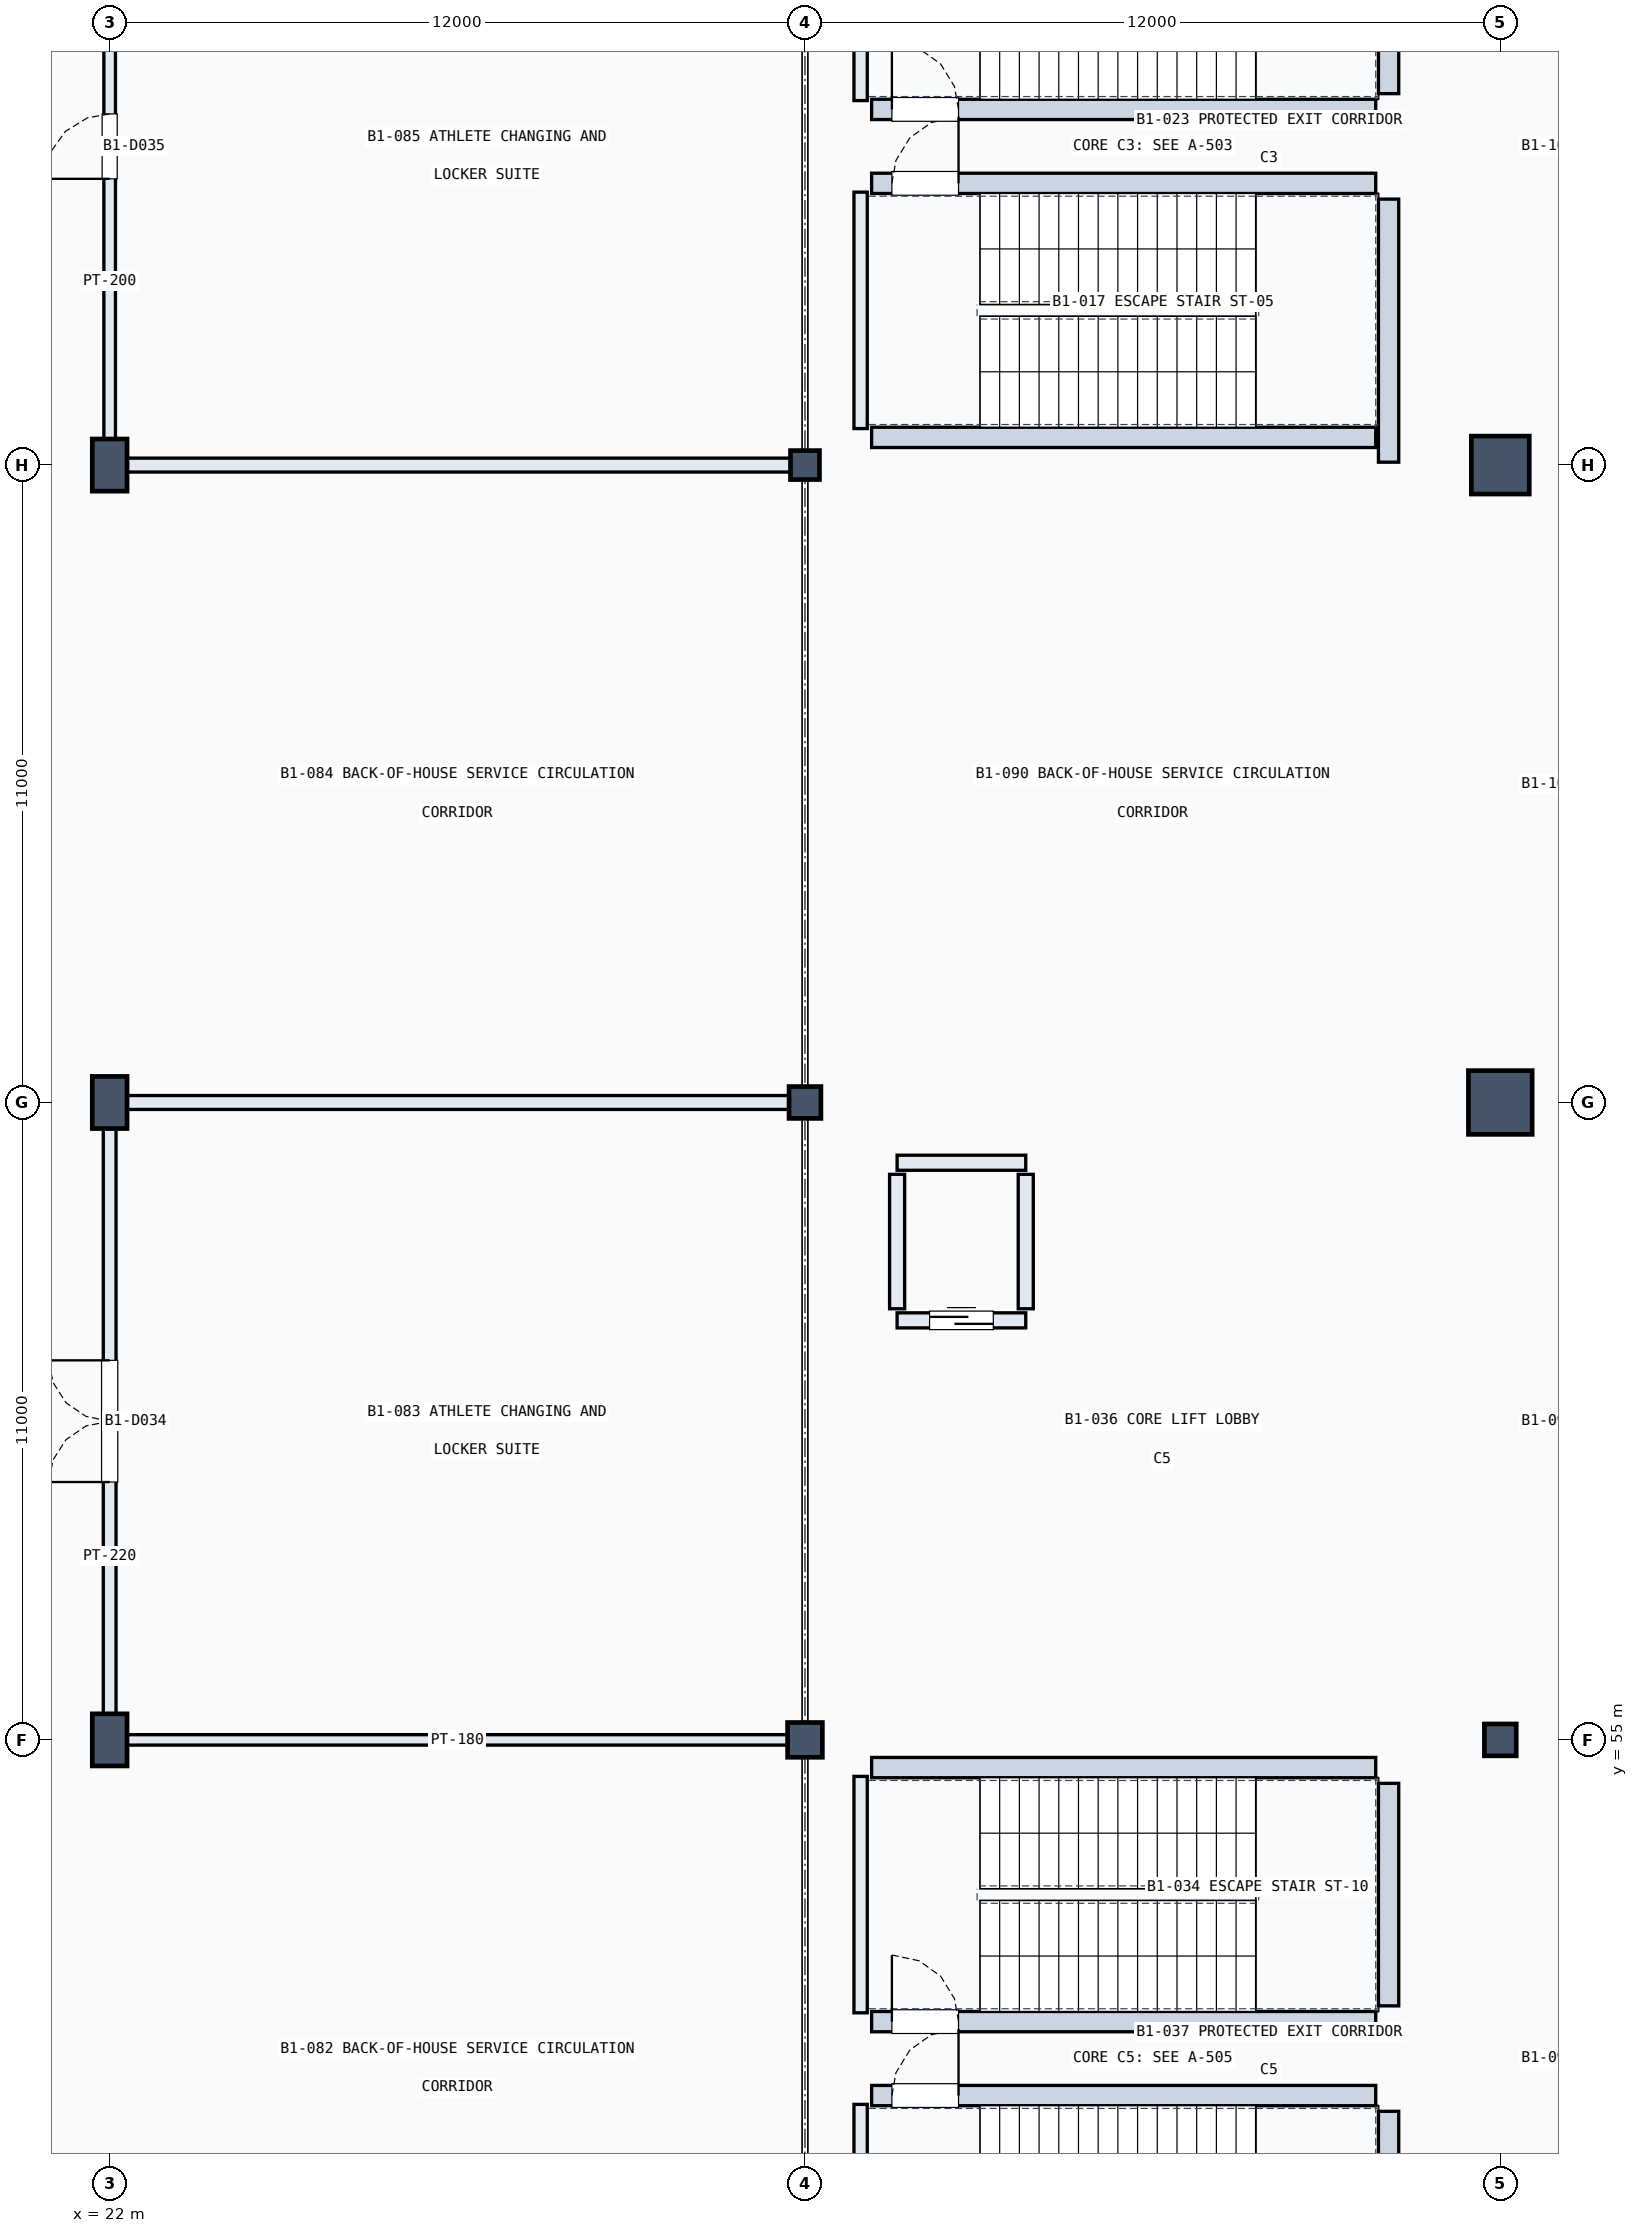
"""IFC4 building model, lengths in metres.
Left out: names, types, materials, properties, quantities, classifications, styles, units other than length and angle.
Written with IfcOpenShell. Run it as: python <this file> out.ifc"""

import sys

from ifc_helpers import new_model, si_unit, direction, frame, frame_2d, origin, origin_2d, place, context, subcontext, project, spatial, rectangle, extrude, element, fill, save


model = new_model("IFC4")
c1 = context("Model", 3, precision=1e-05, world=origin(), true_north=direction((0.0, 1.0)))
c2 = subcontext(c1, "Body", "Model", "MODEL_VIEW")
j1 = project(units=[si_unit("LENGTHUNIT", "METRE"), si_unit("PLANEANGLEUNIT", "RADIAN")], contexts=[c1])
p1 = place(None, origin())
s1 = spatial("IfcSite", under=j1, at=p1, CompositionType="ELEMENT")
p2 = place(p1, origin())
s2 = spatial("IfcBuilding", under=s1, at=p2, CompositionType="ELEMENT")
p3 = place(p2, frame((0.0, 0.0, -5.4)))
s3 = spatial("IfcBuildingStorey", under=s2, at=p3, CompositionType="ELEMENT", Elevation=-5.4)
for number, where, z_axis, x_axis in (
    (1, (22.0, 55.0, 0.0), (0.0, 0.0, 1.0), (1.0, 0.0, 0.0)),
    (2, (22.0, 66.0, 0.0), (0.0, 0.0, 1.0), (1.0, 0.0, 0.0)),
    (3, (22.0, 77.0, 0.0), (0.0, 0.0, 1.0), (1.0, 0.0, 0.0)),
):
    element("IfcColumn", number, at=place(p3, frame(where, z_axis=z_axis, x_axis=x_axis)), inside=s3, PredefinedType="COLUMN", context=c2, shape_type="SweptSolid", body=[
        extrude(rectangle(XDim=0.6, YDim=0.9, at=origin_2d()), origin(), (0.0, 0.0, 1.0), 5.4),
    ])
p4 = place(p3, frame((34.0, 55.0, 0.0), z_axis=(0.0, 0.0, 1.0), x_axis=(1.0, 0.0, 0.0)))
e4 = element("IfcColumn", 4, at=p4, inside=s3, PredefinedType="COLUMN", context=c2, shape_type="SweptSolid", body=[
    extrude(rectangle(XDim=0.6, YDim=0.6, at=origin_2d()), origin(), (0.0, 0.0, 1.0), 5.4),
])
p5 = place(p3, frame((34.0, 66.0, 0.0), z_axis=(0.0, 0.0, 1.0), x_axis=(1.0, 0.0, 0.0)))
e5 = element("IfcColumn", 5, at=p5, inside=s3, PredefinedType="COLUMN", context=c2, shape_type="SweptSolid", body=[
    extrude(rectangle(XDim=0.55, YDim=0.55, at=origin_2d()), origin(), (0.0, 0.0, 1.0), 5.4),
])
p6 = place(p3, frame((34.0, 77.0, 0.0), z_axis=(0.0, 0.0, 1.0), x_axis=(1.0, 0.0, 0.0)))
e6 = element("IfcColumn", 6, at=p6, inside=s3, PredefinedType="COLUMN", context=c2, shape_type="SweptSolid", body=[
    extrude(rectangle(XDim=0.5, YDim=0.5, at=origin_2d()), origin(), (0.0, 0.0, 1.0), 5.4),
])
p7 = place(p3, frame((46.0, 55.0, 0.0), z_axis=(0.0, 0.0, 1.0), x_axis=(1.0, 0.0, 0.0)))
e7 = element("IfcColumn", 7, at=p7, inside=s3, PredefinedType="COLUMN", context=c2, shape_type="SweptSolid", body=[
    extrude(rectangle(XDim=0.55, YDim=0.55, at=origin_2d()), origin(), (0.0, 0.0, 1.0), 5.4),
])
p8 = place(p3, frame((46.0, 66.0, 0.0), z_axis=(0.0, 0.0, 1.0), x_axis=(1.0, 0.0, 0.0)))
e8 = element("IfcColumn", 8, at=p8, inside=s3, PredefinedType="COLUMN", context=c2, shape_type="SweptSolid", body=[
    extrude(rectangle(XDim=1.1, YDim=1.1, at=origin_2d()), origin(), (0.0, 0.0, 1.0), 5.4),
])
p9 = place(p3, frame((46.0, 77.0, 0.0), z_axis=(0.0, 0.0, 1.0), x_axis=(1.0, 0.0, 0.0)))
e9 = element("IfcColumn", 9, at=p9, inside=s3, PredefinedType="COLUMN", context=c2, shape_type="SweptSolid", body=[
    extrude(rectangle(XDim=1.0, YDim=1.0, at=origin_2d()), origin(), (0.0, 0.0, 1.0), 5.4),
])
p10 = place(p3, frame((34.96, 77.63, 0.0), z_axis=(0.0, 0.0, 1.0), x_axis=(0.0, 1.0, 0.0)))
e10 = element("IfcWall", 10, at=p10, inside=s3, PredefinedType="SOLIDWALL", context=c2, shape_type="SweptSolid", body=[
    extrude(rectangle(XDim=4.08, YDim=0.23, at=frame_2d((2.04, 0.0))), origin(), (0.0, 0.0, 1.0), 4.43),
])
p11 = place(p3, frame((44.072, 77.05, 0.0), z_axis=(0.0, 0.0, 1.0), x_axis=(0.0, 1.0, 0.0)))
e11 = element("IfcWall", 11, at=p11, inside=s3, PredefinedType="SOLIDWALL", context=c2, shape_type="SweptSolid", body=[
    extrude(rectangle(XDim=4.54, YDim=0.35, at=frame_2d((2.27, 0.0))), origin(), (0.0, 0.0, 1.0), 5.04),
])
p12 = place(p3, frame((35.15, 77.478, 0.0), z_axis=(0.0, 0.0, 1.0), x_axis=(1.0, 0.0, 0.0)))
e12 = element("IfcWall", 12, at=p12, inside=s3, PredefinedType="SOLIDWALL", context=c2, shape_type="SweptSolid", body=[
    extrude(rectangle(XDim=8.7, YDim=0.35, at=frame_2d((4.35, 0.0))), origin(), (0.0, 0.0, 1.0), 5.04),
])
p13 = place(p3, frame((35.15, 81.862, 0.0), z_axis=(0.0, 0.0, 1.0), x_axis=(1.0, 0.0, 0.0)))
e13 = element("IfcWall", 13, at=p13, inside=s3, PredefinedType="SOLIDWALL", context=c2, shape_type="SweptSolid", body=[
    extrude(rectangle(XDim=8.7, YDim=0.35, at=frame_2d((4.35, 0.0))), origin(), (0.0, 0.0, 1.0), 5.04),
])
p14 = place(p13, frame((0.35, 0.0, 0.0)))
e14 = element("IfcOpeningElement", 14, at=p14, cuts=e13, PredefinedType="OPENING", context=c2, shape_type="SweptSolid", body=[
    extrude(rectangle(XDim=1.15, YDim=2.2, at=frame_2d((0.575, 1.1))), frame((0.0, 0.185, 0.0), z_axis=(0.0, -1.0, 0.0), x_axis=(1.0, 0.0, 0.0)), (0.0, 0.0, 1.0), 0.37),
])
p15 = place(p3, frame((34.96, 83.29, 0.0), z_axis=(0.0, 0.0, 1.0), x_axis=(0.0, 1.0, 0.0)))
e15 = element("IfcWall", 15, at=p15, inside=s3, PredefinedType="SOLIDWALL", context=c2, shape_type="SweptSolid", body=[
    extrude(rectangle(XDim=4.08, YDim=0.23, at=frame_2d((2.04, 0.0))), origin(), (0.0, 0.0, 1.0), 4.43),
])
p16 = place(p3, frame((44.072, 83.41, 0.0), z_axis=(0.0, 0.0, 1.0), x_axis=(0.0, 1.0, 0.0)))
e16 = element("IfcWall", 16, at=p16, inside=s3, PredefinedType="SOLIDWALL", context=c2, shape_type="SweptSolid", body=[
    extrude(rectangle(XDim=3.84, YDim=0.35, at=frame_2d((1.92, 0.0))), origin(), (0.0, 0.0, 1.0), 5.04),
])
p17 = place(p3, frame((35.15, 83.138, 0.0), z_axis=(0.0, 0.0, 1.0), x_axis=(1.0, 0.0, 0.0)))
e17 = element("IfcWall", 17, at=p17, inside=s3, PredefinedType="SOLIDWALL", context=c2, shape_type="SweptSolid", body=[
    extrude(rectangle(XDim=8.7, YDim=0.35, at=frame_2d((4.35, 0.0))), origin(), (0.0, 0.0, 1.0), 5.04),
])
p18 = place(p17, frame((0.35, 0.0, 0.0)))
e18 = element("IfcOpeningElement", 18, at=p18, cuts=e17, PredefinedType="OPENING", context=c2, shape_type="SweptSolid", body=[
    extrude(rectangle(XDim=1.15, YDim=2.2, at=frame_2d((0.575, 1.1))), frame((0.0, 0.185, 0.0), z_axis=(0.0, -1.0, 0.0), x_axis=(1.0, 0.0, 0.0)), (0.0, 0.0, 1.0), 0.37),
])
p19 = place(p3, frame((34.96, 44.63, 0.0), z_axis=(0.0, 0.0, 1.0), x_axis=(0.0, 1.0, 0.0)))
e19 = element("IfcWall", 19, at=p19, inside=s3, PredefinedType="SOLIDWALL", context=c2, shape_type="SweptSolid", body=[
    extrude(rectangle(XDim=4.08, YDim=0.23, at=frame_2d((2.04, 0.0))), origin(), (0.0, 0.0, 1.0), 4.43),
])
p20 = place(p3, frame((44.072, 44.05, 0.0), z_axis=(0.0, 0.0, 1.0), x_axis=(0.0, 1.0, 0.0)))
e20 = element("IfcWall", 20, at=p20, inside=s3, PredefinedType="SOLIDWALL", context=c2, shape_type="SweptSolid", body=[
    extrude(rectangle(XDim=4.54, YDim=0.35, at=frame_2d((2.27, 0.0))), origin(), (0.0, 0.0, 1.0), 5.04),
])
p21 = place(p3, frame((35.15, 48.862, 0.0), z_axis=(0.0, 0.0, 1.0), x_axis=(1.0, 0.0, 0.0)))
e21 = element("IfcWall", 21, at=p21, inside=s3, PredefinedType="SOLIDWALL", context=c2, shape_type="SweptSolid", body=[
    extrude(rectangle(XDim=8.7, YDim=0.35, at=frame_2d((4.35, 0.0))), origin(), (0.0, 0.0, 1.0), 5.04),
])
p22 = place(p21, frame((0.35, 0.0, 0.0)))
e22 = element("IfcOpeningElement", 22, at=p22, cuts=e21, PredefinedType="OPENING", context=c2, shape_type="SweptSolid", body=[
    extrude(rectangle(XDim=1.15, YDim=2.2, at=frame_2d((0.575, 1.1))), frame((0.0, 0.185, 0.0), z_axis=(0.0, -1.0, 0.0), x_axis=(1.0, 0.0, 0.0)), (0.0, 0.0, 1.0), 0.37),
])
p23 = place(p3, frame((34.96, 50.29, 0.0), z_axis=(0.0, 0.0, 1.0), x_axis=(0.0, 1.0, 0.0)))
e23 = element("IfcWall", 23, at=p23, inside=s3, PredefinedType="SOLIDWALL", context=c2, shape_type="SweptSolid", body=[
    extrude(rectangle(XDim=4.08, YDim=0.23, at=frame_2d((2.04, 0.0))), origin(), (0.0, 0.0, 1.0), 4.43),
])
p24 = place(p3, frame((44.072, 50.41, 0.0), z_axis=(0.0, 0.0, 1.0), x_axis=(0.0, 1.0, 0.0)))
e24 = element("IfcWall", 24, at=p24, inside=s3, PredefinedType="SOLIDWALL", context=c2, shape_type="SweptSolid", body=[
    extrude(rectangle(XDim=3.84, YDim=0.35, at=frame_2d((1.92, 0.0))), origin(), (0.0, 0.0, 1.0), 5.04),
])
p25 = place(p3, frame((35.15, 50.138, 0.0), z_axis=(0.0, 0.0, 1.0), x_axis=(1.0, 0.0, 0.0)))
e25 = element("IfcWall", 25, at=p25, inside=s3, PredefinedType="SOLIDWALL", context=c2, shape_type="SweptSolid", body=[
    extrude(rectangle(XDim=8.7, YDim=0.35, at=frame_2d((4.35, 0.0))), origin(), (0.0, 0.0, 1.0), 5.04),
])
p26 = place(p25, frame((0.35, 0.0, 0.0)))
e26 = element("IfcOpeningElement", 26, at=p26, cuts=e25, PredefinedType="OPENING", context=c2, shape_type="SweptSolid", body=[
    extrude(rectangle(XDim=1.15, YDim=2.2, at=frame_2d((0.575, 1.1))), frame((0.0, 0.185, 0.0), z_axis=(0.0, -1.0, 0.0), x_axis=(1.0, 0.0, 0.0)), (0.0, 0.0, 1.0), 0.37),
])
p27 = place(p3, frame((35.15, 54.522, 0.0), z_axis=(0.0, 0.0, 1.0), x_axis=(1.0, 0.0, 0.0)))
e27 = element("IfcWall", 27, at=p27, inside=s3, PredefinedType="SOLIDWALL", context=c2, shape_type="SweptSolid", body=[
    extrude(rectangle(XDim=8.7, YDim=0.35, at=frame_2d((4.35, 0.0))), origin(), (0.0, 0.0, 1.0), 5.04),
])
p28 = place(p3, frame((35.59, 62.24, 0.0), z_axis=(0.0, 0.0, 1.0), x_axis=(1.0, 0.0, 0.0)))
e28 = element("IfcWall", 28, at=p28, inside=s3, PredefinedType="SOLIDWALL", context=c2, shape_type="SweptSolid", body=[
    extrude(rectangle(XDim=2.22, YDim=0.26, at=frame_2d((1.11, 0.0))), origin(), (0.0, 0.0, 1.0), 5.04),
])
p29 = place(p28, frame((0.56, 0.0, 0.0)))
e29 = element("IfcOpeningElement", 29, at=p29, cuts=e28, PredefinedType="OPENING", context=c2, shape_type="SweptSolid", body=[
    extrude(rectangle(XDim=1.1, YDim=2.15, at=frame_2d((0.55, 1.075))), frame((0.0, 0.14, 0.0), z_axis=(0.0, -1.0, 0.0), x_axis=(1.0, 0.0, 0.0)), (0.0, 0.0, 1.0), 0.28),
])
p30 = place(p3, frame((35.59, 64.96, 0.0), z_axis=(0.0, 0.0, 1.0), x_axis=(1.0, 0.0, 0.0)))
e30 = element("IfcWall", 30, at=p30, inside=s3, PredefinedType="SOLIDWALL", context=c2, shape_type="SweptSolid", body=[
    extrude(rectangle(XDim=2.22, YDim=0.26, at=frame_2d((1.11, 0.0))), origin(), (0.0, 0.0, 1.0), 5.04),
])
for number, where, z_axis, x_axis in (
    (31, (35.59, 62.44, 0.0), (0.0, 0.0, 1.0), (0.0, 1.0, 0.0)),
    (32, (37.81, 62.44, 0.0), (0.0, 0.0, 1.0), (0.0, 1.0, 0.0)),
):
    element("IfcWall", number, at=place(p3, frame(where, z_axis=z_axis, x_axis=x_axis)), inside=s3, PredefinedType="SOLIDWALL", context=c2, shape_type="SweptSolid", body=[
        extrude(rectangle(XDim=2.32, YDim=0.26, at=frame_2d((1.16, 0.0))), origin(), (0.0, 0.0, 1.0), 5.04),
    ])
p31 = place(p3, frame((22.0, 55.22, 0.0), z_axis=(0.0, 0.0, 1.0), x_axis=(0.0, 1.0, 0.0)))
e33 = element("IfcWall", 33, at=p31, inside=s3, PredefinedType="PARTITIONING", context=c2, shape_type="SweptSolid", body=[
    extrude(rectangle(XDim=10.56, YDim=0.22, at=frame_2d((5.28, 0.0))), origin(), (0.0, 0.0, 1.0), 4.08),
])
p32 = place(p31, frame((4.23, 0.0, 0.0)))
e34 = element("IfcOpeningElement", 34, at=p32, cuts=e33, PredefinedType="OPENING", context=c2, shape_type="SweptSolid", body=[
    extrude(rectangle(XDim=2.1, YDim=2.2, at=frame_2d((1.05, 1.1))), frame((0.0, 0.12, 0.0), z_axis=(0.0, -1.0, 0.0), x_axis=(1.0, 0.0, 0.0)), (0.0, 0.0, 1.0), 0.24),
])
p33 = place(p3, frame((22.0, 77.22, 0.0), z_axis=(0.0, 0.0, 1.0), x_axis=(0.0, 1.0, 0.0)))
e35 = element("IfcWall", 35, at=p33, inside=s3, PredefinedType="PARTITIONING", context=c2, shape_type="SweptSolid", body=[
    extrude(rectangle(XDim=10.56, YDim=0.2, at=frame_2d((5.28, 0.0))), origin(), (0.0, 0.0, 1.0), 4.08),
])
p34 = place(p33, frame((4.72, 0.0, 0.0)))
e36 = element("IfcOpeningElement", 36, at=p34, cuts=e35, PredefinedType="OPENING", context=c2, shape_type="SweptSolid", body=[
    extrude(rectangle(XDim=1.12, YDim=2.25, at=frame_2d((0.56, 1.125))), frame((0.0, 0.11, 0.0), z_axis=(0.0, -1.0, 0.0), x_axis=(1.0, 0.0, 0.0)), (0.0, 0.0, 1.0), 0.22),
])
p35 = place(p3, frame((22.22, 55.0, 0.0), z_axis=(0.0, 0.0, 1.0), x_axis=(1.0, 0.0, 0.0)))
e37 = element("IfcWall", 37, at=p35, inside=s3, PredefinedType="PARTITIONING", context=c2, shape_type="SweptSolid", body=[
    extrude(rectangle(XDim=11.56, YDim=0.18, at=frame_2d((5.78, 0.0))), origin(), (0.0, 0.0, 1.0), 4.08),
])
p36 = place(p3, frame((22.22, 66.0, 0.0), z_axis=(0.0, 0.0, 1.0), x_axis=(1.0, 0.0, 0.0)))
e38 = element("IfcWall", 38, at=p36, inside=s3, PredefinedType="PARTITIONING", context=c2, shape_type="SweptSolid", body=[
    extrude(rectangle(XDim=11.56, YDim=0.24, at=frame_2d((5.78, 0.0))), origin(), (0.0, 0.0, 1.0), 4.08),
])
p37 = place(p3, frame((22.22, 77.0, 0.0), z_axis=(0.0, 0.0, 1.0), x_axis=(1.0, 0.0, 0.0)))
e39 = element("IfcWall", 39, at=p37, inside=s3, PredefinedType="PARTITIONING", context=c2, shape_type="SweptSolid", body=[
    extrude(rectangle(XDim=11.57, YDim=0.24, at=frame_2d((5.785, 0.0))), origin(), (0.0, 0.0, 1.0), 4.08),
])
p38 = place(p14, origin())
e40 = element("IfcDoor", 40, at=p38, inside=s3, OperationType="SINGLE_SWING_RIGHT", PredefinedType="DOOR", context=c2, shape_type="SweptSolid", body=[
    extrude(rectangle(XDim=1.15, YDim=2.2, at=frame_2d((0.575, 1.1))), frame((0.0, 0.025, 0.0), z_axis=(0.0, -1.0, 0.0), x_axis=(1.0, 0.0, 0.0)), (0.0, 0.0, 1.0), 0.05),
])
fill(e14, e40)
p39 = place(p18, origin())
e41 = element("IfcDoor", 41, at=p39, inside=s3, OperationType="SINGLE_SWING_LEFT", PredefinedType="DOOR", context=c2, shape_type="SweptSolid", body=[
    extrude(rectangle(XDim=1.15, YDim=2.2, at=frame_2d((0.575, 1.1))), frame((0.0, 0.025, 0.0), z_axis=(0.0, -1.0, 0.0), x_axis=(1.0, 0.0, 0.0)), (0.0, 0.0, 1.0), 0.05),
])
fill(e18, e41)
p40 = place(p22, origin())
e42 = element("IfcDoor", 42, at=p40, inside=s3, OperationType="SINGLE_SWING_RIGHT", PredefinedType="DOOR", context=c2, shape_type="SweptSolid", body=[
    extrude(rectangle(XDim=1.15, YDim=2.2, at=frame_2d((0.575, 1.1))), frame((0.0, 0.025, 0.0), z_axis=(0.0, -1.0, 0.0), x_axis=(1.0, 0.0, 0.0)), (0.0, 0.0, 1.0), 0.05),
])
fill(e22, e42)
p41 = place(p26, origin())
e43 = element("IfcDoor", 43, at=p41, inside=s3, OperationType="SINGLE_SWING_LEFT", PredefinedType="DOOR", context=c2, shape_type="SweptSolid", body=[
    extrude(rectangle(XDim=1.15, YDim=2.2, at=frame_2d((0.575, 1.1))), frame((0.0, 0.025, 0.0), z_axis=(0.0, -1.0, 0.0), x_axis=(1.0, 0.0, 0.0)), (0.0, 0.0, 1.0), 0.05),
])
fill(e26, e43)
p42 = place(p29, origin())
e44 = element("IfcDoor", 44, at=p42, inside=s3, OperationType="SLIDING_TO_LEFT", PredefinedType="DOOR", context=c2, shape_type="SweptSolid", body=[
    extrude(rectangle(XDim=1.1, YDim=2.15, at=frame_2d((0.55, 1.075))), frame((0.0, 0.025, 0.0), z_axis=(0.0, -1.0, 0.0), x_axis=(1.0, 0.0, 0.0)), (0.0, 0.0, 1.0), 0.05),
])
fill(e29, e44)
p43 = place(p32, origin())
e45 = element("IfcDoor", 45, at=p43, inside=s3, OperationType="DOUBLE_DOOR_SINGLE_SWING", PredefinedType="DOOR", context=c2, shape_type="SweptSolid", body=[
    extrude(rectangle(XDim=2.1, YDim=2.2, at=frame_2d((1.05, 1.1))), frame((0.0, 0.025, 0.0), z_axis=(0.0, -1.0, 0.0), x_axis=(1.0, 0.0, 0.0)), (0.0, 0.0, 1.0), 0.05),
])
fill(e34, e45)
p44 = place(p34, origin())
e46 = element("IfcDoor", 46, at=p44, inside=s3, OperationType="SINGLE_SWING_LEFT", PredefinedType="DOOR", context=c2, shape_type="SweptSolid", body=[
    extrude(rectangle(XDim=1.12, YDim=2.25, at=frame_2d((0.56, 1.125))), frame((0.0, 0.025, 0.0), z_axis=(0.0, -1.0, 0.0), x_axis=(1.0, 0.0, 0.0)), (0.0, 0.0, 1.0), 0.05),
])
fill(e36, e46)
save(model, sys.argv[1])
